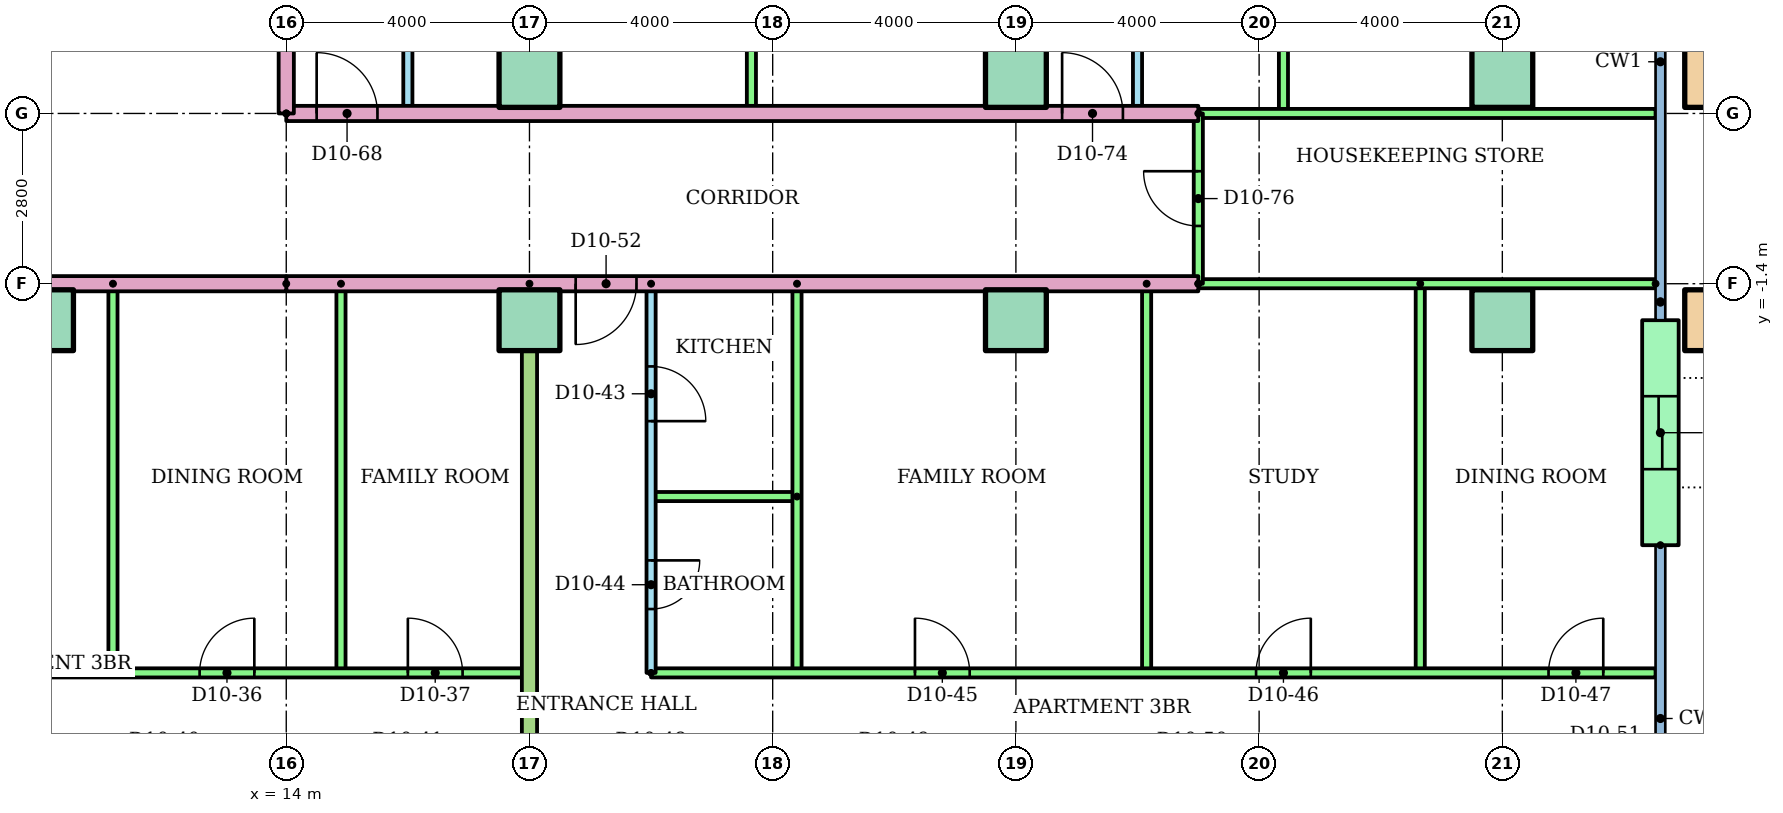
"""IFC4 building model, lengths in metres.
Left out: names, types, materials, properties, quantities, classifications, styles, units other than length and angle.
Written with IfcOpenShell. Run it as: python <this file> out.ifc"""

import sys

from ifc_helpers import new_model, si_unit, direction, frame, frame_2d, origin, origin_2d, place, context, subcontext, project, spatial, rectangle, hollow_rectangle, extrude, element, fill, save


model = new_model("IFC4")
c1 = context("Model", 3, precision=1e-05, world=origin(), true_north=direction((0.0, 1.0)))
c2 = subcontext(c1, "Body", "Model", "MODEL_VIEW")
j1 = project(units=[si_unit("LENGTHUNIT", "METRE"), si_unit("PLANEANGLEUNIT", "RADIAN")], contexts=[c1])
p1 = place(None, origin())
s1 = spatial("IfcSite", under=j1, at=p1, CompositionType="ELEMENT")
p2 = place(p1, origin())
s2 = spatial("IfcBuilding", under=s1, at=p2, CompositionType="ELEMENT")
p3 = place(p2, frame((0.0, 0.0, 41.6)))
s3 = spatial("IfcBuildingStorey", under=s2, at=p3, CompositionType="ELEMENT", Elevation=41.6)
for number, where in (
    (1, (10.0, -2.0, 0.0)),
    (2, (18.0, -2.0, 0.0)),
    (3, (26.0, -2.0, 0.0)),
    (4, (34.0, -2.0, 0.0)),
):
    element("IfcColumn", number, at=place(p3, frame(where)), inside=s3, PredefinedType="COLUMN", context=c2, shape_type="SweptSolid", body=[
        extrude(rectangle(XDim=1.0, YDim=1.0, at=origin_2d()), origin(), (0.0, 0.0, 1.0), 3.2),
    ])
p4 = place(p3, frame((37.5, -2.0, 0.0)))
e5 = element("IfcColumn", 5, at=p4, inside=s3, PredefinedType="COLUMN", context=c2, shape_type="SweptSolid", body=[
    extrude(hollow_rectangle(XDim=1.0, YDim=1.0, WallThickness=0.05, at=origin_2d()), origin(), (0.0, 0.0, 1.0), 3.2),
])
for number, where in (
    (6, (18.0, 2.0, 0.0)),
    (7, (26.0, 2.0, 0.0)),
    (8, (34.0, 2.0, 0.0)),
):
    element("IfcColumn", number, at=place(p3, frame(where)), inside=s3, PredefinedType="COLUMN", context=c2, shape_type="SweptSolid", body=[
        extrude(rectangle(XDim=1.0, YDim=1.0, at=origin_2d()), origin(), (0.0, 0.0, 1.0), 3.2),
    ])
p5 = place(p3, frame((37.5, 2.0, 0.0)))
e9 = element("IfcColumn", 9, at=p5, inside=s3, PredefinedType="COLUMN", context=c2, shape_type="SweptSolid", body=[
    extrude(hollow_rectangle(XDim=1.0, YDim=1.0, WallThickness=0.05, at=origin_2d()), origin(), (0.0, 0.0, 1.0), 3.2),
])
p6 = place(p3, frame((36.6, -5.7, 0.0), z_axis=(0.0, 0.0, 1.0), x_axis=(0.0, 1.0, 0.0)))
e10 = element("IfcWall", 10, at=p6, inside=s3, PredefinedType="STANDARD", context=c2, shape_type="SweptSolid", body=[
    extrude(rectangle(XDim=3.7, YDim=0.6, at=frame_2d((1.85, 0.0))), origin(), (0.0, 0.0, 1.0), 2.92),
])
p7 = place(p6, frame((1.25, 0.0, 0.0)))
e11 = element("IfcOpeningElement", 11, at=p7, cuts=e10, PredefinedType="OPENING", context=c2, shape_type="SweptSolid", body=[
    extrude(rectangle(XDim=1.2, YDim=2.1, at=frame_2d((0.6, 1.05))), frame((0.0, 0.31, 0.0), z_axis=(0.0, -1.0, 0.0), x_axis=(1.0, 0.0, 0.0)), (0.0, 0.0, 1.0), 0.62),
])
for number, where, z_axis, x_axis in (
    (12, (11.15, -1.4, 0.0), (0.0, 0.0, 1.0), (0.0, -1.0, 0.0)),
    (13, (14.9, -1.4, 0.0), (0.0, 0.0, 1.0), (0.0, -1.0, 0.0)),
):
    element("IfcWall", number, at=place(p3, frame(where, z_axis=z_axis, x_axis=x_axis)), inside=s3, PredefinedType="PARTITIONING", context=c2, shape_type="SweptSolid", body=[
        extrude(rectangle(XDim=6.4, YDim=0.15, at=frame_2d((3.2, 0.0))), origin(), (0.0, 0.0, 1.0), 2.4),
    ])
p8 = place(p3, frame((4.0, -7.8, 0.0)))
e14 = element("IfcWall", 14, at=p8, inside=s3, PredefinedType="PARTITIONING", context=c2, shape_type="SweptSolid", body=[
    extrude(rectangle(XDim=14.0, YDim=0.15, at=frame_2d((7.0, 0.0))), origin(), (0.0, 0.0, 1.0), 2.4),
])
p9 = place(p8, frame((4.325, 0.0, 0.0)))
e15 = element("IfcOpeningElement", 15, at=p9, cuts=e14, PredefinedType="OPENING", context=c2, shape_type="SweptSolid", body=[
    extrude(rectangle(XDim=0.9, YDim=2.1, at=frame_2d((0.45, 1.05))), frame((0.0, 0.085, 0.0), z_axis=(0.0, -1.0, 0.0), x_axis=(1.0, 0.0, 0.0)), (0.0, 0.0, 1.0), 0.17),
])
p10 = place(p8, frame((8.575, 0.0, 0.0)))
e16 = element("IfcOpeningElement", 16, at=p10, cuts=e14, PredefinedType="OPENING", context=c2, shape_type="SweptSolid", body=[
    extrude(rectangle(XDim=0.9, YDim=2.1, at=frame_2d((0.45, 1.05))), frame((0.0, 0.085, 0.0), z_axis=(0.0, -1.0, 0.0), x_axis=(1.0, 0.0, 0.0)), (0.0, 0.0, 1.0), 0.17),
])
p11 = place(p8, frame((12.0, 0.0, 0.0)))
e17 = element("IfcOpeningElement", 17, at=p11, cuts=e14, PredefinedType="OPENING", context=c2, shape_type="SweptSolid", body=[
    extrude(rectangle(XDim=0.9, YDim=2.1, at=frame_2d((0.45, 1.05))), frame((0.0, 0.085, 0.0), z_axis=(0.0, -1.0, 0.0), x_axis=(1.0, 0.0, 0.0)), (0.0, 0.0, 1.0), 0.17),
])
p12 = place(p3, frame((20.0, -1.4, 0.0), z_axis=(0.0, 0.0, 1.0), x_axis=(0.0, -1.0, 0.0)))
e18 = element("IfcWall", 18, at=p12, inside=s3, PredefinedType="PARTITIONING", context=c2, shape_type="SweptSolid", body=[
    extrude(rectangle(XDim=6.4, YDim=0.15, at=frame_2d((3.2, 0.0))), origin(), (0.0, 0.0, 1.0), 2.4),
])
p13 = place(p12, frame((1.36, 0.0, 0.0)))
e19 = element("IfcOpeningElement", 19, at=p13, cuts=e18, PredefinedType="OPENING", context=c2, shape_type="SweptSolid", body=[
    extrude(rectangle(XDim=0.9, YDim=2.1, at=frame_2d((0.45, 1.05))), frame((0.0, 0.085, 0.0), z_axis=(0.0, -1.0, 0.0), x_axis=(1.0, 0.0, 0.0)), (0.0, 0.0, 1.0), 0.17),
])
p14 = place(p12, frame((4.55, 0.0, 0.0)))
e20 = element("IfcOpeningElement", 20, at=p14, cuts=e18, PredefinedType="OPENING", context=c2, shape_type="SweptSolid", body=[
    extrude(rectangle(XDim=0.8, YDim=2.1, at=frame_2d((0.4, 1.05))), frame((0.0, 0.085, 0.0), z_axis=(0.0, -1.0, 0.0), x_axis=(1.0, 0.0, 0.0)), (0.0, 0.0, 1.0), 0.17),
])
p15 = place(p3, frame((22.4, -4.9, 0.0), z_axis=(0.0, 0.0, 1.0), x_axis=(-1.0, 0.0, 0.0)))
e21 = element("IfcWall", 21, at=p15, inside=s3, PredefinedType="PARTITIONING", context=c2, shape_type="SweptSolid", body=[
    extrude(rectangle(XDim=2.4, YDim=0.15, at=frame_2d((1.2, 0.0))), origin(), (0.0, 0.0, 1.0), 2.4),
])
for number, where, z_axis, x_axis in (
    (22, (22.4, -1.4, 0.0), (0.0, 0.0, 1.0), (0.0, -1.0, 0.0)),
    (23, (28.15, -1.4, 0.0), (0.0, 0.0, 1.0), (0.0, -1.0, 0.0)),
    (24, (32.65, -1.4, 0.0), (0.0, 0.0, 1.0), (0.0, -1.0, 0.0)),
):
    element("IfcWall", number, at=place(p3, frame(where, z_axis=z_axis, x_axis=x_axis)), inside=s3, PredefinedType="PARTITIONING", context=c2, shape_type="SweptSolid", body=[
        extrude(rectangle(XDim=6.4, YDim=0.15, at=frame_2d((3.2, 0.0))), origin(), (0.0, 0.0, 1.0), 2.4),
    ])
p16 = place(p3, frame((20.0, -7.8, 0.0)))
e25 = element("IfcWall", 25, at=p16, inside=s3, PredefinedType="PARTITIONING", context=c2, shape_type="SweptSolid", body=[
    extrude(rectangle(XDim=16.52, YDim=0.15, at=frame_2d((8.26, 0.0))), origin(), (0.0, 0.0, 1.0), 2.4),
])
p17 = place(p16, frame((4.34, 0.0, 0.0)))
e26 = element("IfcOpeningElement", 26, at=p17, cuts=e25, PredefinedType="OPENING", context=c2, shape_type="SweptSolid", body=[
    extrude(rectangle(XDim=0.9, YDim=2.1, at=frame_2d((0.45, 1.05))), frame((0.0, 0.085, 0.0), z_axis=(0.0, -1.0, 0.0), x_axis=(1.0, 0.0, 0.0)), (0.0, 0.0, 1.0), 0.17),
])
p18 = place(p16, frame((9.95, 0.0, 0.0)))
e27 = element("IfcOpeningElement", 27, at=p18, cuts=e25, PredefinedType="OPENING", context=c2, shape_type="SweptSolid", body=[
    extrude(rectangle(XDim=0.9, YDim=2.1, at=frame_2d((0.45, 1.05))), frame((0.0, 0.085, 0.0), z_axis=(0.0, -1.0, 0.0), x_axis=(1.0, 0.0, 0.0)), (0.0, 0.0, 1.0), 0.17),
])
p19 = place(p16, frame((14.76, 0.0, 0.0)))
e28 = element("IfcOpeningElement", 28, at=p19, cuts=e25, PredefinedType="OPENING", context=c2, shape_type="SweptSolid", body=[
    extrude(rectangle(XDim=0.9, YDim=2.1, at=frame_2d((0.45, 1.05))), frame((0.0, 0.085, 0.0), z_axis=(0.0, -1.0, 0.0), x_axis=(1.0, 0.0, 0.0)), (0.0, 0.0, 1.0), 0.17),
])
p20 = place(p3, frame((18.0, -1.4, 0.0), z_axis=(0.0, 0.0, 1.0), x_axis=(0.0, -1.0, 0.0)))
e29 = element("IfcWall", 29, at=p20, inside=s3, PredefinedType="PARTITIONING", context=c2, shape_type="SweptSolid", body=[
    extrude(rectangle(XDim=14.71, YDim=0.25, at=frame_2d((7.355, 0.0))), origin(), (0.0, 0.0, 1.0), 2.4),
])
p21 = place(p3, frame((29.0, -1.4, 0.0), z_axis=(0.0, 0.0, 1.0), x_axis=(-1.0, 0.0, 0.0)))
e30 = element("IfcWall", 30, at=p21, inside=s3, PredefinedType="PARTITIONING", context=c2, shape_type="SweptSolid", body=[
    extrude(rectangle(XDim=15.0, YDim=0.25, at=frame_2d((7.5, 0.0))), origin(), (0.0, 0.0, 1.0), 2.4),
])
p22 = place(p21, frame((9.24, 0.0, 0.0)))
e31 = element("IfcOpeningElement", 31, at=p22, cuts=e30, PredefinedType="OPENING", context=c2, shape_type="SweptSolid", body=[
    extrude(rectangle(XDim=1.0, YDim=2.1, at=frame_2d((0.5, 1.05))), frame((0.0, 0.135, 0.0), z_axis=(0.0, -1.0, 0.0), x_axis=(1.0, 0.0, 0.0)), (0.0, 0.0, 1.0), 0.27),
])
p23 = place(p3, frame((36.52, -1.4, 0.0), z_axis=(0.0, 0.0, 1.0), x_axis=(-1.0, 0.0, 0.0)))
e32 = element("IfcWall", 32, at=p23, inside=s3, PredefinedType="PARTITIONING", context=c2, shape_type="SweptSolid", body=[
    extrude(rectangle(XDim=7.52, YDim=0.15, at=frame_2d((3.76, 0.0))), origin(), (0.0, 0.0, 1.0), 2.4),
])
p24 = place(p3, frame((16.0, 10.2, 0.0), z_axis=(0.0, 0.0, 1.0), x_axis=(0.0, -1.0, 0.0)))
e33 = element("IfcWall", 33, at=p24, inside=s3, PredefinedType="PARTITIONING", context=c2, shape_type="SweptSolid", body=[
    extrude(rectangle(XDim=8.8, YDim=0.15, at=frame_2d((4.4, 0.0))), origin(), (0.0, 0.0, 1.0), 2.4),
])
p25 = place(p24, frame((5.975, 0.0, 0.0)))
e34 = element("IfcOpeningElement", 34, at=p25, cuts=e33, PredefinedType="OPENING", context=c2, shape_type="SweptSolid", body=[
    extrude(rectangle(XDim=0.9, YDim=2.1, at=frame_2d((0.45, 1.05))), frame((0.0, 0.085, 0.0), z_axis=(0.0, -1.0, 0.0), x_axis=(1.0, 0.0, 0.0)), (0.0, 0.0, 1.0), 0.17),
])
p26 = place(p24, frame((1.625, 0.0, 0.0)))
e35 = element("IfcOpeningElement", 35, at=p26, cuts=e33, PredefinedType="OPENING", context=c2, shape_type="SweptSolid", body=[
    extrude(rectangle(XDim=0.8, YDim=2.1, at=frame_2d((0.4, 1.05))), frame((0.0, 0.085, 0.0), z_axis=(0.0, -1.0, 0.0), x_axis=(1.0, 0.0, 0.0)), (0.0, 0.0, 1.0), 0.17),
])
for number, where, z_axis, x_axis in (
    (36, (18.4, 10.2, 0.0), (0.0, 0.0, 1.0), (0.0, -1.0, 0.0)),
    (37, (21.65, 10.2, 0.0), (0.0, 0.0, 1.0), (0.0, -1.0, 0.0)),
):
    element("IfcWall", number, at=place(p3, frame(where, z_axis=z_axis, x_axis=x_axis)), inside=s3, PredefinedType="PARTITIONING", context=c2, shape_type="SweptSolid", body=[
        extrude(rectangle(XDim=8.8, YDim=0.15, at=frame_2d((4.4, 0.0))), origin(), (0.0, 0.0, 1.0), 2.4),
    ])
p27 = place(p3, frame((28.0, 10.2, 0.0), z_axis=(0.0, 0.0, 1.0), x_axis=(0.0, -1.0, 0.0)))
e38 = element("IfcWall", 38, at=p27, inside=s3, PredefinedType="PARTITIONING", context=c2, shape_type="SweptSolid", body=[
    extrude(rectangle(XDim=8.8, YDim=0.15, at=frame_2d((4.4, 0.0))), origin(), (0.0, 0.0, 1.0), 2.4),
])
p28 = place(p27, frame((5.975, 0.0, 0.0)))
e39 = element("IfcOpeningElement", 39, at=p28, cuts=e38, PredefinedType="OPENING", context=c2, shape_type="SweptSolid", body=[
    extrude(rectangle(XDim=0.9, YDim=2.1, at=frame_2d((0.45, 1.05))), frame((0.0, 0.085, 0.0), z_axis=(0.0, -1.0, 0.0), x_axis=(1.0, 0.0, 0.0)), (0.0, 0.0, 1.0), 0.17),
])
p29 = place(p27, frame((1.625, 0.0, 0.0)))
e40 = element("IfcOpeningElement", 40, at=p29, cuts=e38, PredefinedType="OPENING", context=c2, shape_type="SweptSolid", body=[
    extrude(rectangle(XDim=0.8, YDim=2.1, at=frame_2d((0.4, 1.05))), frame((0.0, 0.085, 0.0), z_axis=(0.0, -1.0, 0.0), x_axis=(1.0, 0.0, 0.0)), (0.0, 0.0, 1.0), 0.17),
])
p30 = place(p3, frame((30.4, 10.2, 0.0), z_axis=(0.0, 0.0, 1.0), x_axis=(0.0, -1.0, 0.0)))
e41 = element("IfcWall", 41, at=p30, inside=s3, PredefinedType="PARTITIONING", context=c2, shape_type="SweptSolid", body=[
    extrude(rectangle(XDim=8.8, YDim=0.15, at=frame_2d((4.4, 0.0))), origin(), (0.0, 0.0, 1.0), 2.4),
])
p31 = place(p3, frame((26.0, 18.521, 0.0), z_axis=(0.0, 0.0, 1.0), x_axis=(0.0, -1.0, 0.0)))
e42 = element("IfcWall", 42, at=p31, inside=s3, PredefinedType="PARTITIONING", context=c2, shape_type="SweptSolid", body=[
    extrude(rectangle(XDim=17.121, YDim=0.25, at=frame_2d((8.561, 0.0))), origin(), (0.0, 0.0, 1.0), 2.4),
])
p32 = place(p3, frame((14.0, 1.4, 0.0)))
e43 = element("IfcWall", 43, at=p32, inside=s3, PredefinedType="PARTITIONING", context=c2, shape_type="SweptSolid", body=[
    extrude(rectangle(XDim=15.0, YDim=0.25, at=frame_2d((7.5, 0.0))), origin(), (0.0, 0.0, 1.0), 2.4),
])
p33 = place(p32, frame((0.5, 0.0, 0.0)))
e44 = element("IfcOpeningElement", 44, at=p33, cuts=e43, PredefinedType="OPENING", context=c2, shape_type="SweptSolid", body=[
    extrude(rectangle(XDim=1.0, YDim=2.1, at=frame_2d((0.5, 1.05))), frame((0.0, 0.135, 0.0), z_axis=(0.0, -1.0, 0.0), x_axis=(1.0, 0.0, 0.0)), (0.0, 0.0, 1.0), 0.27),
])
p34 = place(p32, frame((12.76, 0.0, 0.0)))
e45 = element("IfcOpeningElement", 45, at=p34, cuts=e43, PredefinedType="OPENING", context=c2, shape_type="SweptSolid", body=[
    extrude(rectangle(XDim=1.0, YDim=2.1, at=frame_2d((0.5, 1.05))), frame((0.0, 0.135, 0.0), z_axis=(0.0, -1.0, 0.0), x_axis=(1.0, 0.0, 0.0)), (0.0, 0.0, 1.0), 0.27),
])
p35 = place(p3, frame((29.0, 1.4, 0.0)))
e46 = element("IfcWall", 46, at=p35, inside=s3, PredefinedType="PARTITIONING", context=c2, shape_type="SweptSolid", body=[
    extrude(rectangle(XDim=7.52, YDim=0.15, at=frame_2d((3.76, 0.0))), origin(), (0.0, 0.0, 1.0), 2.4),
])
p36 = place(p3, frame((29.0, -1.4, 0.0), z_axis=(0.0, 0.0, 1.0), x_axis=(0.0, 1.0, 0.0)))
e47 = element("IfcWall", 47, at=p36, inside=s3, PredefinedType="PARTITIONING", context=c2, shape_type="SweptSolid", body=[
    extrude(rectangle(XDim=2.8, YDim=0.15, at=frame_2d((1.4, 0.0))), origin(), (0.0, 0.0, 1.0), 2.4),
])
p37 = place(p36, frame((0.95, 0.0, 0.0)))
e48 = element("IfcOpeningElement", 48, at=p37, cuts=e47, PredefinedType="OPENING", context=c2, shape_type="SweptSolid", body=[
    extrude(rectangle(XDim=0.9, YDim=2.1, at=frame_2d((0.45, 1.05))), frame((0.0, 0.085, 0.0), z_axis=(0.0, -1.0, 0.0), x_axis=(1.0, 0.0, 0.0)), (0.0, 0.0, 1.0), 0.17),
])
p38 = place(p3, frame((14.0, -1.4, 0.0), z_axis=(0.0, 0.0, 1.0), x_axis=(-1.0, 0.0, 0.0)))
e49 = element("IfcWall", 49, at=p38, inside=s3, PredefinedType="PARTITIONING", context=c2, shape_type="SweptSolid", body=[
    extrude(rectangle(XDim=28.0, YDim=0.25, at=frame_2d((14.0, 0.0))), origin(), (0.0, 0.0, 1.0), 2.4),
])
p39 = place(p38, frame((12.76, 0.0, 0.0)))
e50 = element("IfcOpeningElement", 50, at=p39, cuts=e49, PredefinedType="OPENING", context=c2, shape_type="SweptSolid", body=[
    extrude(rectangle(XDim=1.0, YDim=2.1, at=frame_2d((0.5, 1.05))), frame((0.0, 0.135, 0.0), z_axis=(0.0, -1.0, 0.0), x_axis=(1.0, 0.0, 0.0)), (0.0, 0.0, 1.0), 0.27),
])
p40 = place(p38, frame((10.24, 0.0, 0.0)))
e51 = element("IfcOpeningElement", 51, at=p40, cuts=e49, PredefinedType="OPENING", context=c2, shape_type="SweptSolid", body=[
    extrude(rectangle(XDim=1.0, YDim=2.1, at=frame_2d((0.5, 1.05))), frame((0.0, 0.135, 0.0), z_axis=(0.0, -1.0, 0.0), x_axis=(1.0, 0.0, 0.0)), (0.0, 0.0, 1.0), 0.27),
])
p41 = place(p3, frame((14.0, 1.4, 0.0), z_axis=(0.0, 0.0, 1.0), x_axis=(0.0, 1.0, 0.0)))
e52 = element("IfcWall", 52, at=p41, inside=s3, PredefinedType="PARTITIONING", context=c2, shape_type="SweptSolid", body=[
    extrude(rectangle(XDim=1.6, YDim=0.25, at=frame_2d((0.8, 0.0))), origin(), (0.0, 0.0, 1.0), 2.4),
])
p42 = place(p10, origin())
e53 = element("IfcDoor", 53, at=p42, inside=s3, OperationType="SINGLE_SWING_RIGHT", PredefinedType="DOOR", context=c2, shape_type="SweptSolid", body=[
    extrude(rectangle(XDim=0.9, YDim=2.1, at=frame_2d((0.45, 1.05))), frame((0.0, 0.025, 0.0), z_axis=(0.0, -1.0, 0.0), x_axis=(1.0, 0.0, 0.0)), (0.0, 0.0, 1.0), 0.05),
])
fill(e16, e53)
p43 = place(p11, origin())
e54 = element("IfcDoor", 54, at=p43, inside=s3, OperationType="SINGLE_SWING_LEFT", PredefinedType="DOOR", context=c2, shape_type="SweptSolid", body=[
    extrude(rectangle(XDim=0.9, YDim=2.1, at=frame_2d((0.45, 1.05))), frame((0.0, 0.025, 0.0), z_axis=(0.0, -1.0, 0.0), x_axis=(1.0, 0.0, 0.0)), (0.0, 0.0, 1.0), 0.05),
])
fill(e17, e54)
p44 = place(p13, origin())
e55 = element("IfcDoor", 55, at=p44, inside=s3, OperationType="SINGLE_SWING_RIGHT", PredefinedType="DOOR", context=c2, shape_type="SweptSolid", body=[
    extrude(rectangle(XDim=0.9, YDim=2.1, at=frame_2d((0.45, 1.05))), frame((0.0, 0.025, 0.0), z_axis=(0.0, -1.0, 0.0), x_axis=(1.0, 0.0, 0.0)), (0.0, 0.0, 1.0), 0.05),
])
fill(e19, e55)
p45 = place(p14, origin())
e56 = element("IfcDoor", 56, at=p45, inside=s3, OperationType="SINGLE_SWING_LEFT", PredefinedType="DOOR", context=c2, shape_type="SweptSolid", body=[
    extrude(rectangle(XDim=0.8, YDim=2.1, at=frame_2d((0.4, 1.05))), frame((0.0, 0.025, 0.0), z_axis=(0.0, -1.0, 0.0), x_axis=(1.0, 0.0, 0.0)), (0.0, 0.0, 1.0), 0.05),
])
fill(e20, e56)
p46 = place(p17, origin())
e57 = element("IfcDoor", 57, at=p46, inside=s3, OperationType="SINGLE_SWING_LEFT", PredefinedType="DOOR", context=c2, shape_type="SweptSolid", body=[
    extrude(rectangle(XDim=0.9, YDim=2.1, at=frame_2d((0.45, 1.05))), frame((0.0, 0.025, 0.0), z_axis=(0.0, -1.0, 0.0), x_axis=(1.0, 0.0, 0.0)), (0.0, 0.0, 1.0), 0.05),
])
fill(e26, e57)
p47 = place(p18, origin())
e58 = element("IfcDoor", 58, at=p47, inside=s3, OperationType="SINGLE_SWING_RIGHT", PredefinedType="DOOR", context=c2, shape_type="SweptSolid", body=[
    extrude(rectangle(XDim=0.9, YDim=2.1, at=frame_2d((0.45, 1.05))), frame((0.0, 0.025, 0.0), z_axis=(0.0, -1.0, 0.0), x_axis=(1.0, 0.0, 0.0)), (0.0, 0.0, 1.0), 0.05),
])
fill(e27, e58)
p48 = place(p19, origin())
e59 = element("IfcDoor", 59, at=p48, inside=s3, OperationType="SINGLE_SWING_RIGHT", PredefinedType="DOOR", context=c2, shape_type="SweptSolid", body=[
    extrude(rectangle(XDim=0.9, YDim=2.1, at=frame_2d((0.45, 1.05))), frame((0.0, 0.025, 0.0), z_axis=(0.0, -1.0, 0.0), x_axis=(1.0, 0.0, 0.0)), (0.0, 0.0, 1.0), 0.05),
])
fill(e28, e59)
p49 = place(p22, origin())
e60 = element("IfcDoor", 60, at=p49, inside=s3, OperationType="SINGLE_SWING_RIGHT", PredefinedType="DOOR", context=c2, shape_type="SweptSolid", body=[
    extrude(rectangle(XDim=1.0, YDim=2.1, at=frame_2d((0.5, 1.05))), frame((0.0, 0.025, 0.0), z_axis=(0.0, -1.0, 0.0), x_axis=(1.0, 0.0, 0.0)), (0.0, 0.0, 1.0), 0.05),
])
fill(e31, e60)
p50 = place(p33, origin())
e61 = element("IfcDoor", 61, at=p50, inside=s3, OperationType="SINGLE_SWING_LEFT", PredefinedType="DOOR", context=c2, shape_type="SweptSolid", body=[
    extrude(rectangle(XDim=1.0, YDim=2.1, at=frame_2d((0.5, 1.05))), frame((0.0, 0.025, 0.0), z_axis=(0.0, -1.0, 0.0), x_axis=(1.0, 0.0, 0.0)), (0.0, 0.0, 1.0), 0.05),
])
fill(e44, e61)
p51 = place(p34, origin())
e62 = element("IfcDoor", 62, at=p51, inside=s3, OperationType="SINGLE_SWING_LEFT", PredefinedType="DOOR", context=c2, shape_type="SweptSolid", body=[
    extrude(rectangle(XDim=1.0, YDim=2.1, at=frame_2d((0.5, 1.05))), frame((0.0, 0.025, 0.0), z_axis=(0.0, -1.0, 0.0), x_axis=(1.0, 0.0, 0.0)), (0.0, 0.0, 1.0), 0.05),
])
fill(e45, e62)
p52 = place(p37, origin())
e63 = element("IfcDoor", 63, at=p52, inside=s3, OperationType="SINGLE_SWING_RIGHT", PredefinedType="DOOR", context=c2, shape_type="SweptSolid", body=[
    extrude(rectangle(XDim=0.9, YDim=2.1, at=frame_2d((0.45, 1.05))), frame((0.0, 0.025, 0.0), z_axis=(0.0, -1.0, 0.0), x_axis=(1.0, 0.0, 0.0)), (0.0, 0.0, 1.0), 0.05),
])
fill(e48, e63)
p53 = place(p7, origin())
e64 = element("IfcDoor", 64, at=p53, inside=s3, OperationType="SLIDING_TO_LEFT", PredefinedType="DOOR", context=c2, shape_type="SweptSolid", body=[
    extrude(rectangle(XDim=1.2, YDim=2.1, at=frame_2d((0.6, 1.05))), frame((0.0, 0.025, 0.0), z_axis=(0.0, -1.0, 0.0), x_axis=(1.0, 0.0, 0.0)), (0.0, 0.0, 1.0), 0.05),
])
fill(e11, e64)
save(model, sys.argv[1])
